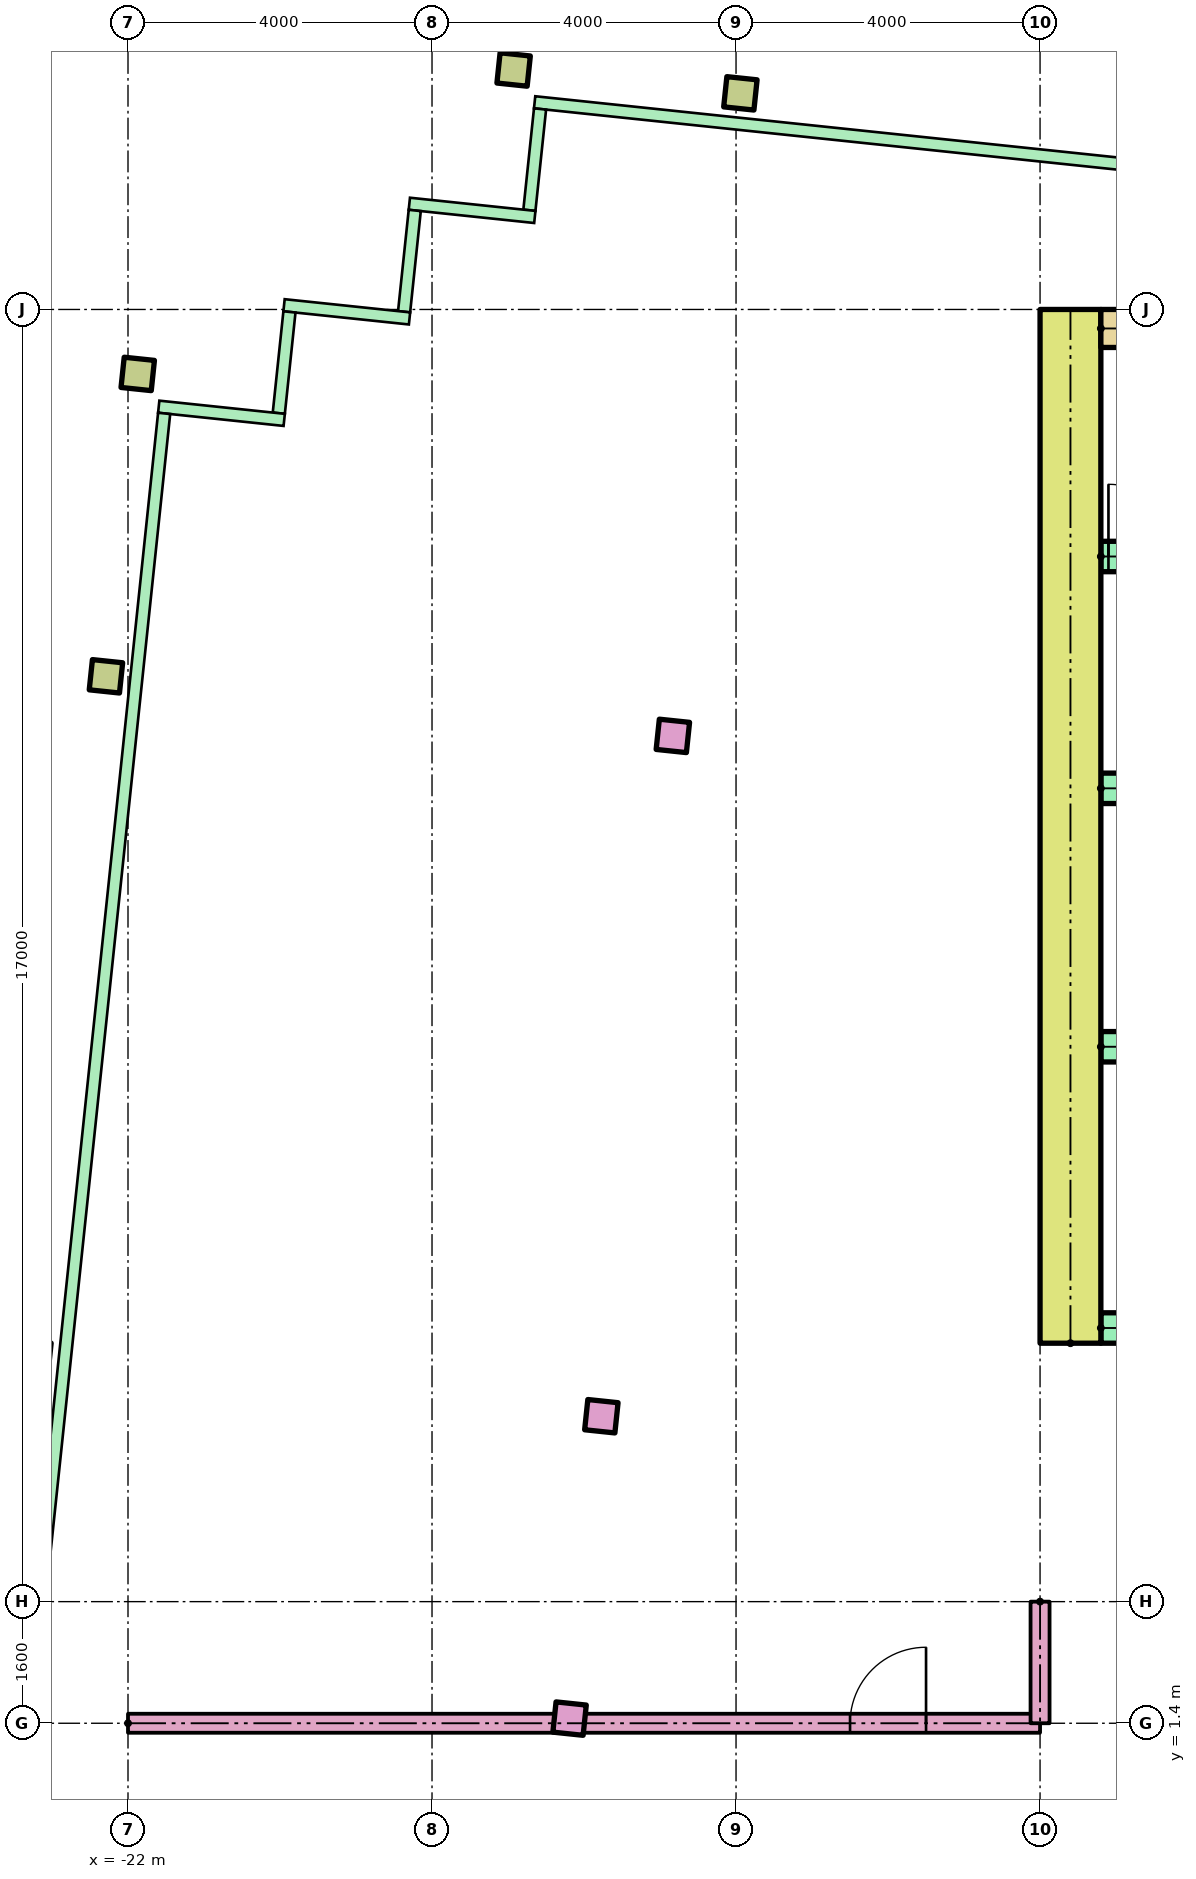
"""IFC4 building model, lengths in metres.
Left out: names, types, materials, properties, quantities, classifications, styles, units other than length and angle.
Written with IfcOpenShell. Run it as: python <this file> out.ifc"""

import sys

from ifc_helpers import new_model, si_unit, direction, frame, frame_2d, origin, origin_2d, place, context, subcontext, project, spatial, rectangle, hollow_rectangle, extrude, element, fill, save


model = new_model("IFC4")
c1 = context("Model", 3, precision=1e-05, world=origin(), true_north=direction((0.0, 1.0)))
c2 = subcontext(c1, "Body", "Model", "MODEL_VIEW")
j1 = project(units=[si_unit("LENGTHUNIT", "METRE"), si_unit("PLANEANGLEUNIT", "RADIAN")], contexts=[c1])
p1 = place(None, origin())
s1 = spatial("IfcSite", under=j1, at=p1, CompositionType="ELEMENT")
p2 = place(p1, origin())
s2 = spatial("IfcBuilding", under=s1, at=p2, CompositionType="ELEMENT")
p3 = place(p2, frame((0.0, 0.0, 291.5)))
s3 = spatial("IfcBuildingStorey", under=s2, at=p3, CompositionType="ELEMENT", Elevation=291.5)
for number, where, z_axis, x_axis in (
    (1, (-16.19, 1.461, 0.0), (0.0, 0.0, 1.0), (0.995, -0.105, 0.0)),
    (2, (-15.772, 5.439, 0.0), (0.0, 0.0, 1.0), (0.995, -0.105, 0.0)),
):
    element("IfcColumn", number, at=place(p3, frame(where, z_axis=z_axis, x_axis=x_axis)), inside=s3, PredefinedType="COLUMN", context=c2, shape_type="SweptSolid", body=[
        extrude(rectangle(XDim=0.4, YDim=0.4, at=origin_2d()), origin(), (0.0, 0.0, 1.0), 3.4),
    ])
p4 = place(p3, frame((-22.29, 15.174, 0.0), z_axis=(0.0, 0.0, 1.0), x_axis=(0.994521895368, -0.104528463268, 0.0)))
e3 = element("IfcColumn", 3, at=p4, inside=s3, PredefinedType="COLUMN", context=c2, shape_type="SweptSolid", body=[
    extrude(hollow_rectangle(XDim=0.4, YDim=0.4, WallThickness=0.02, at=origin_2d()), origin(), (0.0, 0.0, 1.0), 3.4),
])
p5 = place(p3, frame((-14.831, 14.39, 0.0), z_axis=(0.0, 0.0, 1.0), x_axis=(0.994521895368, -0.104528463268, 0.0)))
e4 = element("IfcColumn", 4, at=p5, inside=s3, PredefinedType="COLUMN", context=c2, shape_type="SweptSolid", body=[
    extrude(rectangle(XDim=0.4, YDim=0.4, at=origin_2d()), origin(), (0.0, 0.0, 1.0), 3.4),
])
for number, where, z_axis, x_axis in (
    (5, (-21.872, 19.152, 0.0), (0.0, 0.0, 1.0), (0.995, -0.105, 0.0)),
    (6, (-16.926, 23.157, 0.0), (0.0, 0.0, 1.0), (0.995, -0.105, 0.0)),
    (7, (-13.943, 22.843, 0.0), (0.0, 0.0, 1.0), (0.995, -0.105, 0.0)),
):
    element("IfcColumn", number, at=place(p3, frame(where, z_axis=z_axis, x_axis=x_axis)), inside=s3, PredefinedType="COLUMN", context=c2, shape_type="SweptSolid", body=[
        extrude(hollow_rectangle(XDim=0.4, YDim=0.4, WallThickness=0.02, at=origin_2d()), origin(), (0.0, 0.0, 1.0), 3.4),
    ])
p6 = place(p3, frame((-9.6, 6.4, 0.0), z_axis=(0.0, 0.0, 1.0), x_axis=(0.0, 1.0, 0.0)))
e8 = element("IfcWall", 8, at=p6, inside=s3, PredefinedType="SHEAR", context=c2, shape_type="SweptSolid", body=[
    extrude(rectangle(XDim=13.6, YDim=0.8, at=frame_2d((6.8, 0.0))), origin(), (0.0, 0.0, 1.0), 3.12),
])
p7 = place(p3, frame((-9.2, 19.75, 0.0)))
e9 = element("IfcWall", 9, at=p7, inside=s3, PredefinedType="SHEAR", context=c2, shape_type="SweptSolid", body=[
    extrude(rectangle(XDim=18.4, YDim=0.5, at=frame_2d((9.2, 0.0))), origin(), (0.0, 0.0, 1.0), 3.12),
])
p8 = place(p3, frame((-9.2, 6.6, 0.0)))
e10 = element("IfcWall", 10, at=p8, inside=s3, PredefinedType="SHEAR", context=c2, shape_type="SweptSolid", body=[
    extrude(rectangle(XDim=18.4, YDim=0.4, at=frame_2d((9.2, 0.0))), origin(), (0.0, 0.0, 1.0), 3.12),
])
p9 = place(p8, frame((8.3, 0.0, 0.0)))
e11 = element("IfcOpeningElement", 11, at=p9, cuts=e10, PredefinedType="OPENING", context=c2, shape_type="SweptSolid", body=[
    extrude(rectangle(XDim=1.8, YDim=2.1, at=frame_2d((0.9, 1.05))), frame((0.0, 0.21, 0.0), z_axis=(0.0, -1.0, 0.0), x_axis=(1.0, 0.0, 0.0)), (0.0, 0.0, 1.0), 0.42),
])
p10 = place(p8, frame((3.8, 0.0, 0.0)))
e12 = element("IfcOpeningElement", 12, at=p10, cuts=e10, PredefinedType="OPENING", context=c2, shape_type="SweptSolid", body=[
    extrude(rectangle(XDim=1.8, YDim=2.1, at=frame_2d((0.9, 1.05))), frame((0.0, 0.21, 0.0), z_axis=(0.0, -1.0, 0.0), x_axis=(1.0, 0.0, 0.0)), (0.0, 0.0, 1.0), 0.42),
])
p11 = place(p8, frame((12.8, 0.0, 0.0)))
e13 = element("IfcOpeningElement", 13, at=p11, cuts=e10, PredefinedType="OPENING", context=c2, shape_type="SweptSolid", body=[
    extrude(rectangle(XDim=1.8, YDim=2.1, at=frame_2d((0.9, 1.05))), frame((0.0, 0.21, 0.0), z_axis=(0.0, -1.0, 0.0), x_axis=(1.0, 0.0, 0.0)), (0.0, 0.0, 1.0), 0.42),
])
p12 = place(p3, frame((-9.2, 10.3, 0.0)))
e14 = element("IfcWall", 14, at=p12, inside=s3, PredefinedType="SHEAR", context=c2, shape_type="SweptSolid", body=[
    extrude(rectangle(XDim=8.0, YDim=0.4, at=frame_2d((4.0, 0.0))), origin(), (0.0, 0.0, 1.0), 3.12),
])
p13 = place(p12, frame((3.35, 0.0, 0.0)))
e15 = element("IfcOpeningElement", 15, at=p13, cuts=e14, PredefinedType="OPENING", context=c2, shape_type="SweptSolid", body=[
    extrude(rectangle(XDim=1.1, YDim=2.1, at=frame_2d((0.55, 1.05))), frame((0.0, 0.21, 0.0), z_axis=(0.0, -1.0, 0.0), x_axis=(1.0, 0.0, 0.0)), (0.0, 0.0, 1.0), 0.42),
])
p14 = place(p12, frame((6.083, 0.0, 0.0)))
e16 = element("IfcOpeningElement", 16, at=p14, cuts=e14, PredefinedType="OPENING", context=c2, shape_type="SweptSolid", body=[
    extrude(rectangle(XDim=1.1, YDim=2.1, at=frame_2d((0.55, 1.05))), frame((0.0, 0.21, 0.0), z_axis=(0.0, -1.0, 0.0), x_axis=(1.0, 0.0, 0.0)), (0.0, 0.0, 1.0), 0.42),
])
p15 = place(p12, frame((0.917, 0.0, 0.0)))
e17 = element("IfcOpeningElement", 17, at=p15, cuts=e14, PredefinedType="OPENING", context=c2, shape_type="SweptSolid", body=[
    extrude(rectangle(XDim=1.0, YDim=2.1, at=frame_2d((0.5, 1.05))), frame((0.0, 0.21, 0.0), z_axis=(0.0, -1.0, 0.0), x_axis=(1.0, 0.0, 0.0)), (0.0, 0.0, 1.0), 0.42),
])
p16 = place(p3, frame((-9.2, 13.7, 0.0)))
e18 = element("IfcWall", 18, at=p16, inside=s3, PredefinedType="SHEAR", context=c2, shape_type="SweptSolid", body=[
    extrude(rectangle(XDim=8.0, YDim=0.4, at=frame_2d((4.0, 0.0))), origin(), (0.0, 0.0, 1.0), 3.12),
])
p17 = place(p3, frame((-9.2, 16.75, 0.0)))
e19 = element("IfcWall", 19, at=p17, inside=s3, PredefinedType="SHEAR", context=c2, shape_type="SweptSolid", body=[
    extrude(rectangle(XDim=18.4, YDim=0.4, at=frame_2d((9.2, 0.0))), origin(), (0.0, 0.0, 1.0), 3.12),
])
p18 = place(p17, frame((0.1, 0.0, 0.0)))
e20 = element("IfcOpeningElement", 20, at=p18, cuts=e19, PredefinedType="OPENING", context=c2, shape_type="SweptSolid", body=[
    extrude(rectangle(XDim=0.95, YDim=2.1, at=frame_2d((0.475, 1.05))), frame((0.0, 0.21, 0.0), z_axis=(0.0, -1.0, 0.0), x_axis=(1.0, 0.0, 0.0)), (0.0, 0.0, 1.0), 0.42),
])
p19 = place(p17, frame((6.1, 0.0, 0.0)))
e21 = element("IfcOpeningElement", 21, at=p19, cuts=e19, PredefinedType="OPENING", context=c2, shape_type="SweptSolid", body=[
    extrude(rectangle(XDim=0.95, YDim=2.1, at=frame_2d((0.475, 1.05))), frame((0.0, 0.21, 0.0), z_axis=(0.0, -1.0, 0.0), x_axis=(1.0, 0.0, 0.0)), (0.0, 0.0, 1.0), 0.42),
])
p20 = place(p17, frame((12.1, 0.0, 0.0)))
e22 = element("IfcOpeningElement", 22, at=p20, cuts=e19, PredefinedType="OPENING", context=c2, shape_type="SweptSolid", body=[
    extrude(rectangle(XDim=0.95, YDim=2.1, at=frame_2d((0.475, 1.05))), frame((0.0, 0.21, 0.0), z_axis=(0.0, -1.0, 0.0), x_axis=(1.0, 0.0, 0.0)), (0.0, 0.0, 1.0), 0.42),
])
p21 = place(p3, frame((-22.0, 1.4, 0.0)))
e23 = element("IfcWall", 23, at=p21, inside=s3, PredefinedType="PARTITIONING", context=c2, shape_type="SweptSolid", body=[
    extrude(rectangle(XDim=12.0, YDim=0.25, at=frame_2d((6.0, 0.0))), origin(), (0.0, 0.0, 1.0), 2.6),
])
p22 = place(p21, frame((9.5, 0.0, 0.0)))
e24 = element("IfcOpeningElement", 24, at=p22, cuts=e23, PredefinedType="OPENING", context=c2, shape_type="SweptSolid", body=[
    extrude(rectangle(XDim=1.0, YDim=2.1, at=frame_2d((0.5, 1.05))), frame((0.0, 0.135, 0.0), z_axis=(0.0, -1.0, 0.0), x_axis=(1.0, 0.0, 0.0)), (0.0, 0.0, 1.0), 0.27),
])
p23 = place(p3, frame((-10.0, 3.0, 0.0), z_axis=(0.0, 0.0, 1.0), x_axis=(0.0, -1.0, 0.0)))
e25 = element("IfcWall", 25, at=p23, inside=s3, PredefinedType="PARTITIONING", context=c2, shape_type="SweptSolid", body=[
    extrude(rectangle(XDim=1.6, YDim=0.25, at=frame_2d((0.8, 0.0))), origin(), (0.0, 0.0, 1.0), 2.6),
])
p24 = place(p18, origin())
e26 = element("IfcDoor", 26, at=p24, inside=s3, OperationType="SINGLE_SWING_LEFT", PredefinedType="DOOR", context=c2, shape_type="SweptSolid", body=[
    extrude(rectangle(XDim=0.95, YDim=2.1, at=frame_2d((0.475, 1.05))), frame((0.0, 0.025, 0.0), z_axis=(0.0, -1.0, 0.0), x_axis=(1.0, 0.0, 0.0)), (0.0, 0.0, 1.0), 0.05),
])
fill(e20, e26)
p25 = place(p22, origin())
e27 = element("IfcDoor", 27, at=p25, inside=s3, OperationType="SINGLE_SWING_RIGHT", PredefinedType="DOOR", context=c2, shape_type="SweptSolid", body=[
    extrude(rectangle(XDim=1.0, YDim=2.1, at=frame_2d((0.5, 1.05))), frame((0.0, 0.025, 0.0), z_axis=(0.0, -1.0, 0.0), x_axis=(1.0, 0.0, 0.0)), (0.0, 0.0, 1.0), 0.05),
])
fill(e24, e27)
save(model, sys.argv[1])
